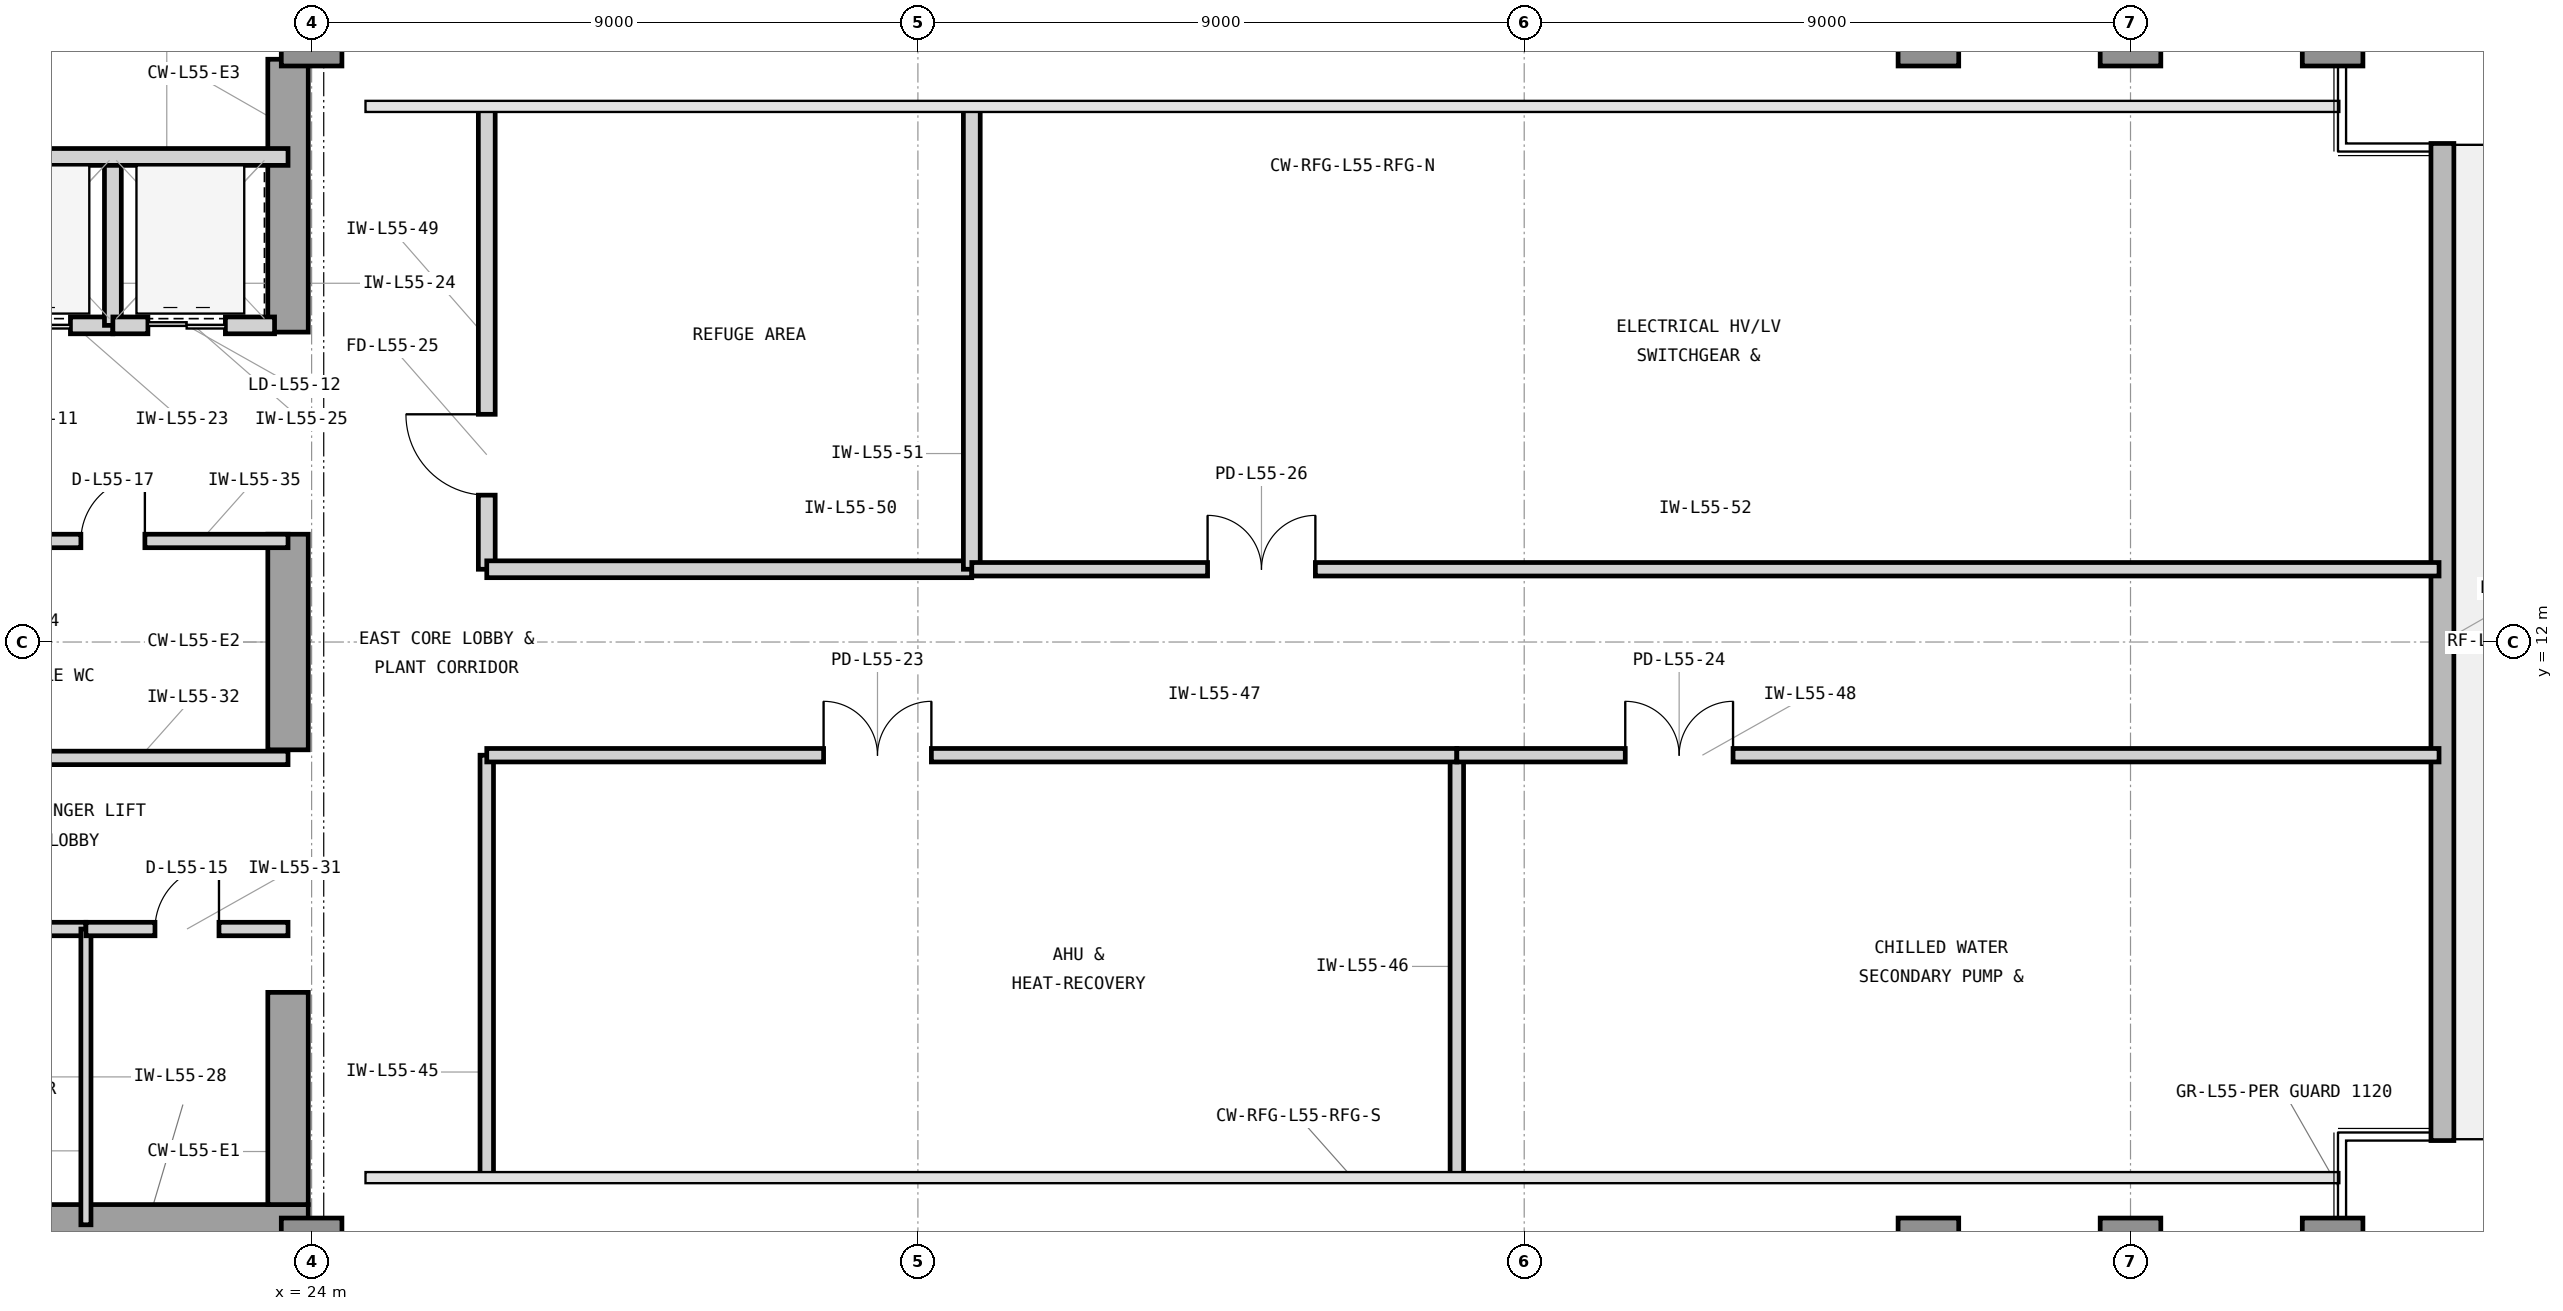
"""IFC4 building model, lengths in metres.
Left out: names, types, materials, properties, quantities, classifications, styles, units other than length and angle.
Written with IfcOpenShell. Run it as: python <this file> out.ifc"""

import sys

from ifc_helpers import new_model, si_unit, direction, frame, frame_2d, origin, origin_2d, place, context, subcontext, project, spatial, rectangle, extrude, element, fill, save


model = new_model("IFC4")
c1 = context("Model", 3, precision=1e-05, world=origin(), true_north=direction((0.0, 1.0)))
c2 = subcontext(c1, "Body", "Model", "MODEL_VIEW")
j1 = project(units=[si_unit("LENGTHUNIT", "METRE"), si_unit("PLANEANGLEUNIT", "RADIAN")], contexts=[c1])
p1 = place(None, origin())
s1 = spatial("IfcSite", under=j1, at=p1, CompositionType="ELEMENT")
p2 = place(p1, origin())
s2 = spatial("IfcBuilding", under=s1, at=p2, CompositionType="ELEMENT")
p3 = place(p2, frame((0.0, 0.0, 226.8)))
s3 = spatial("IfcBuildingStorey", under=s2, at=p3, CompositionType="ELEMENT", Elevation=226.8)
p4 = place(p3, frame((7.475, 3.35, 0.0), z_axis=(0.0, 0.0, 1.0), x_axis=(1.0, 0.0, 0.0)))
e1 = element("IfcWall", 1, at=p4, inside=s3, PredefinedType="SHEAR", context=c2, shape_type="SweptSolid", body=[
    extrude(rectangle(XDim=16.475, YDim=0.6, at=frame_2d((8.237, 0.0))), origin(), (0.0, 0.0, 1.0), 4.5),
])
p5 = place(p3, frame((23.65, 3.65, 0.0), z_axis=(0.0, 0.0, 1.0), x_axis=(0.0, 1.0, 0.0)))
e2 = element("IfcWall", 2, at=p5, inside=s3, PredefinedType="SHEAR", context=c2, shape_type="SweptSolid", body=[
    extrude(rectangle(XDim=3.15, YDim=0.6, at=frame_2d((1.575, 0.0))), origin(), (0.0, 0.0, 1.0), 4.5),
])
p6 = place(p3, frame((23.65, 10.4, 0.0), z_axis=(0.0, 0.0, 1.0), x_axis=(0.0, 1.0, 0.0)))
e3 = element("IfcWall", 3, at=p6, inside=s3, PredefinedType="SHEAR", context=c2, shape_type="SweptSolid", body=[
    extrude(rectangle(XDim=3.2, YDim=0.6, at=frame_2d((1.6, 0.0))), origin(), (0.0, 0.0, 1.0), 4.5),
])
p7 = place(p3, frame((23.65, 16.6, 0.0), z_axis=(0.0, 0.0, 1.0), x_axis=(0.0, 1.0, 0.0)))
e4 = element("IfcWall", 4, at=p7, inside=s3, PredefinedType="SHEAR", context=c2, shape_type="SweptSolid", body=[
    extrude(rectangle(XDim=4.05, YDim=0.6, at=frame_2d((2.025, 0.0))), origin(), (0.0, 0.0, 1.0), 4.5),
])
for number, where, z_axis, x_axis in (
    (5, (24.0, 3.0, 0.0), (0.0, 0.0, 1.0), (1.0, 0.0, 0.0)),
    (6, (24.0, 21.0, 0.0), (0.0, 0.0, 1.0), (1.0, 0.0, 0.0)),
    (7, (48.0, 3.0, 0.0), (0.0, 0.0, 1.0), (1.0, 0.0, 0.0)),
    (8, (48.0, 21.0, 0.0), (0.0, 0.0, 1.0), (1.0, 0.0, 0.0)),
    (9, (51.0, 3.0, 0.0), (0.0, 0.0, 1.0), (1.0, 0.0, 0.0)),
    (10, (51.0, 21.0, 0.0), (0.0, 0.0, 1.0), (1.0, 0.0, 0.0)),
    (11, (54.0, 3.0, 0.0), (0.0, 0.0, 1.0), (1.0, 0.0, 0.0)),
    (12, (54.0, 21.0, 0.0), (0.0, 0.0, 1.0), (1.0, 0.0, 0.0)),
):
    element("IfcColumn", number, at=place(p3, frame(where, z_axis=z_axis, x_axis=x_axis)), inside=s3, PredefinedType="COLUMN", context=c2, shape_type="SweptSolid", body=[
        extrude(rectangle(XDim=0.9, YDim=0.9, at=origin_2d()), origin(), (0.0, 0.0, 1.0), 4.5),
    ])
p8 = place(p3, frame((55.63, 4.6, 0.0), z_axis=(0.0, 0.0, 1.0), x_axis=(0.0, 1.0, 0.0)))
e13 = element("IfcWall", 13, at=p8, inside=s3, PredefinedType="STANDARD", context=c2, shape_type="SweptSolid", body=[
    extrude(rectangle(XDim=14.8, YDim=0.34, at=frame_2d((7.4, 0.0))), origin(), (0.0, 0.0, 1.0), 4.3),
])
p9 = place(p3, frame((18.75, 16.7, 0.0), z_axis=(0.0, 0.0, 1.0), x_axis=(1.0, 0.0, 0.0)))
e14 = element("IfcWall", 14, at=p9, inside=s3, PredefinedType="PARTITIONING", context=c2, shape_type="SweptSolid", body=[
    extrude(rectangle(XDim=2.3, YDim=0.25, at=frame_2d((1.15, 0.0))), origin(), (0.0, 0.0, 1.0), 3.673),
])
p10 = place(p9, frame((0.52, 0.0, 0.0)))
e15 = element("IfcOpeningElement", 15, at=p10, cuts=e14, PredefinedType="OPENING", context=c2, shape_type="SweptSolid", body=[
    extrude(rectangle(XDim=1.15, YDim=2.25, at=frame_2d((0.575, 1.125))), frame((0.0, 0.135, 0.0), z_axis=(0.0, -1.0, 0.0), x_axis=(1.0, 0.0, 0.0)), (0.0, 0.0, 1.0), 0.27),
])
p11 = place(p3, frame((21.05, 16.7, 0.0), z_axis=(0.0, 0.0, 1.0), x_axis=(0.0, 1.0, 0.0)))
e16 = element("IfcWall", 16, at=p11, inside=s3, PredefinedType="PARTITIONING", context=c2, shape_type="SweptSolid", body=[
    extrude(rectangle(XDim=2.5, YDim=0.25, at=frame_2d((1.25, 0.0))), origin(), (0.0, 0.0, 1.0), 4.29),
])
p12 = place(p3, frame((21.05, 16.7, 0.0), z_axis=(0.0, 0.0, 1.0), x_axis=(1.0, 0.0, 0.0)))
e17 = element("IfcWall", 17, at=p12, inside=s3, PredefinedType="PARTITIONING", context=c2, shape_type="SweptSolid", body=[
    extrude(rectangle(XDim=2.4, YDim=0.25, at=frame_2d((1.2, 0.0))), origin(), (0.0, 0.0, 1.0), 3.673),
])
p13 = place(p12, frame((0.52, 0.0, 0.0)))
e18 = element("IfcOpeningElement", 18, at=p13, cuts=e17, PredefinedType="OPENING", context=c2, shape_type="SweptSolid", body=[
    extrude(rectangle(XDim=1.15, YDim=2.25, at=frame_2d((0.575, 1.125))), frame((0.0, 0.135, 0.0), z_axis=(0.0, -1.0, 0.0), x_axis=(1.0, 0.0, 0.0)), (0.0, 0.0, 1.0), 0.27),
])
p14 = place(p3, frame((16.45, 19.2, 0.0), z_axis=(0.0, 0.0, 1.0), x_axis=(1.0, 0.0, 0.0)))
e19 = element("IfcWall", 19, at=p14, inside=s3, PredefinedType="PARTITIONING", context=c2, shape_type="SweptSolid", body=[
    extrude(rectangle(XDim=7.2, YDim=0.25, at=frame_2d((3.6, 0.0))), origin(), (0.0, 0.0, 1.0), 4.29),
])
p15 = place(p3, frame((17.65, 7.74, 0.0), z_axis=(0.0, 0.0, 1.0), x_axis=(1.0, 0.0, 0.0)))
e20 = element("IfcWall", 20, at=p15, inside=s3, PredefinedType="PARTITIONING", context=c2, shape_type="SweptSolid", body=[
    extrude(rectangle(XDim=3.0, YDim=0.2, at=frame_2d((1.5, 0.0))), origin(), (0.0, 0.0, 1.0), 4.29),
])
p16 = place(p15, frame((1.0, 0.0, 0.0)))
e21 = element("IfcOpeningElement", 21, at=p16, cuts=e20, PredefinedType="OPENING", context=c2, shape_type="SweptSolid", body=[
    extrude(rectangle(XDim=1.0, YDim=2.15, at=frame_2d((0.5, 1.075))), frame((0.0, 0.11, 0.0), z_axis=(0.0, -1.0, 0.0), x_axis=(1.0, 0.0, 0.0)), (0.0, 0.0, 1.0), 0.22),
])
p17 = place(p3, frame((20.65, 3.35, 0.0), z_axis=(0.0, 0.0, 1.0), x_axis=(0.0, 1.0, 0.0)))
e22 = element("IfcWall", 22, at=p17, inside=s3, PredefinedType="PARTITIONING", context=c2, shape_type="SweptSolid", body=[
    extrude(rectangle(XDim=4.39, YDim=0.15, at=frame_2d((2.195, 0.0))), origin(), (0.0, 0.0, 1.0), 4.29),
])
p18 = place(p3, frame((20.65, 7.74, 0.0), z_axis=(0.0, 0.0, 1.0), x_axis=(1.0, 0.0, 0.0)))
e23 = element("IfcWall", 23, at=p18, inside=s3, PredefinedType="PARTITIONING", context=c2, shape_type="SweptSolid", body=[
    extrude(rectangle(XDim=3.0, YDim=0.2, at=frame_2d((1.5, 0.0))), origin(), (0.0, 0.0, 1.0), 4.29),
])
p19 = place(p18, frame((1.025, 0.0, 0.0)))
e24 = element("IfcOpeningElement", 24, at=p19, cuts=e23, PredefinedType="OPENING", context=c2, shape_type="SweptSolid", body=[
    extrude(rectangle(XDim=0.95, YDim=2.1, at=frame_2d((0.475, 1.05))), frame((0.0, 0.11, 0.0), z_axis=(0.0, -1.0, 0.0), x_axis=(1.0, 0.0, 0.0)), (0.0, 0.0, 1.0), 0.22),
])
p20 = place(p3, frame((14.825, 10.28, 0.0), z_axis=(0.0, 0.0, 1.0), x_axis=(1.0, 0.0, 0.0)))
e25 = element("IfcWall", 25, at=p20, inside=s3, PredefinedType="PARTITIONING", context=c2, shape_type="SweptSolid", body=[
    extrude(rectangle(XDim=8.825, YDim=0.2, at=frame_2d((4.413, 0.0))), origin(), (0.0, 0.0, 1.0), 4.29),
])
p21 = place(p3, frame((18.45, 13.5, 0.0), z_axis=(0.0, 0.0, 1.0), x_axis=(1.0, 0.0, 0.0)))
e26 = element("IfcWall", 26, at=p21, inside=s3, PredefinedType="PARTITIONING", context=c2, shape_type="SweptSolid", body=[
    extrude(rectangle(XDim=5.2, YDim=0.2, at=frame_2d((2.6, 0.0))), origin(), (0.0, 0.0, 1.0), 3.673),
])
p22 = place(p21, frame((2.125, 0.0, 0.0)))
e27 = element("IfcOpeningElement", 27, at=p22, cuts=e26, PredefinedType="OPENING", context=c2, shape_type="SweptSolid", body=[
    extrude(rectangle(XDim=0.95, YDim=2.1, at=frame_2d((0.475, 1.05))), frame((0.0, 0.11, 0.0), z_axis=(0.0, -1.0, 0.0), x_axis=(1.0, 0.0, 0.0)), (0.0, 0.0, 1.0), 0.22),
])
for number, where, z_axis, x_axis in (
    (28, (26.6, 4.05, 0.0), (0.0, 0.0, 1.0), (0.0, 1.0, 0.0)),
    (29, (41.0, 4.05, 0.0), (0.0, 0.0, 1.0), (0.0, 1.0, 0.0)),
):
    element("IfcWall", number, at=place(p3, frame(where, z_axis=z_axis, x_axis=x_axis)), inside=s3, PredefinedType="PARTITIONING", context=c2, shape_type="SweptSolid", body=[
        extrude(rectangle(XDim=6.27, YDim=0.2, at=frame_2d((3.135, 0.0))), origin(), (0.0, 0.0, 1.0), 4.29),
    ])
p23 = place(p3, frame((26.6, 10.32, 0.0), z_axis=(0.0, 0.0, 1.0), x_axis=(1.0, 0.0, 0.0)))
e30 = element("IfcWall", 30, at=p23, inside=s3, PredefinedType="PARTITIONING", context=c2, shape_type="SweptSolid", body=[
    extrude(rectangle(XDim=14.4, YDim=0.2, at=frame_2d((7.2, 0.0))), origin(), (0.0, 0.0, 1.0), 4.29),
])
p24 = place(p23, frame((5.0, 0.0, 0.0)))
e31 = element("IfcOpeningElement", 31, at=p24, cuts=e30, PredefinedType="OPENING", context=c2, shape_type="SweptSolid", body=[
    extrude(rectangle(XDim=1.6, YDim=2.3, at=frame_2d((0.8, 1.15))), frame((0.0, 0.11, 0.0), z_axis=(0.0, -1.0, 0.0), x_axis=(1.0, 0.0, 0.0)), (0.0, 0.0, 1.0), 0.22),
])
p25 = place(p3, frame((41.0, 10.32, 0.0), z_axis=(0.0, 0.0, 1.0), x_axis=(1.0, 0.0, 0.0)))
e32 = element("IfcWall", 32, at=p25, inside=s3, PredefinedType="PARTITIONING", context=c2, shape_type="SweptSolid", body=[
    extrude(rectangle(XDim=14.58, YDim=0.2, at=frame_2d((7.29, 0.0))), origin(), (0.0, 0.0, 1.0), 4.29),
])
p26 = place(p25, frame((2.5, 0.0, 0.0)))
e33 = element("IfcOpeningElement", 33, at=p26, cuts=e32, PredefinedType="OPENING", context=c2, shape_type="SweptSolid", body=[
    extrude(rectangle(XDim=1.6, YDim=2.3, at=frame_2d((0.8, 1.15))), frame((0.0, 0.11, 0.0), z_axis=(0.0, -1.0, 0.0), x_axis=(1.0, 0.0, 0.0)), (0.0, 0.0, 1.0), 0.22),
])
p27 = place(p3, frame((26.6, 13.08, 0.0), z_axis=(0.0, 0.0, 1.0), x_axis=(0.0, 1.0, 0.0)))
e34 = element("IfcWall", 34, at=p27, inside=s3, PredefinedType="PARTITIONING", context=c2, shape_type="SweptSolid", body=[
    extrude(rectangle(XDim=6.87, YDim=0.25, at=frame_2d((3.435, 0.0))), origin(), (0.0, 0.0, 1.0), 4.29),
])
p28 = place(p27, frame((1.1, 0.0, 0.0)))
e35 = element("IfcOpeningElement", 35, at=p28, cuts=e34, PredefinedType="OPENING", context=c2, shape_type="SweptSolid", body=[
    extrude(rectangle(XDim=1.2, YDim=2.2, at=frame_2d((0.6, 1.1))), frame((0.0, 0.135, 0.0), z_axis=(0.0, -1.0, 0.0), x_axis=(1.0, 0.0, 0.0)), (0.0, 0.0, 1.0), 0.27),
])
p29 = place(p3, frame((26.6, 13.08, 0.0), z_axis=(0.0, 0.0, 1.0), x_axis=(1.0, 0.0, 0.0)))
e36 = element("IfcWall", 36, at=p29, inside=s3, PredefinedType="PARTITIONING", context=c2, shape_type="SweptSolid", body=[
    extrude(rectangle(XDim=7.2, YDim=0.25, at=frame_2d((3.6, 0.0))), origin(), (0.0, 0.0, 1.0), 4.29),
])
p30 = place(p3, frame((33.8, 13.08, 0.0), z_axis=(0.0, 0.0, 1.0), x_axis=(0.0, 1.0, 0.0)))
e37 = element("IfcWall", 37, at=p30, inside=s3, PredefinedType="PARTITIONING", context=c2, shape_type="SweptSolid", body=[
    extrude(rectangle(XDim=6.87, YDim=0.25, at=frame_2d((3.435, 0.0))), origin(), (0.0, 0.0, 1.0), 4.29),
])
p31 = place(p3, frame((33.8, 13.08, 0.0), z_axis=(0.0, 0.0, 1.0), x_axis=(1.0, 0.0, 0.0)))
e38 = element("IfcWall", 38, at=p31, inside=s3, PredefinedType="PARTITIONING", context=c2, shape_type="SweptSolid", body=[
    extrude(rectangle(XDim=21.78, YDim=0.2, at=frame_2d((10.89, 0.0))), origin(), (0.0, 0.0, 1.0), 4.29),
])
p32 = place(p31, frame((3.5, 0.0, 0.0)))
e39 = element("IfcOpeningElement", 39, at=p32, cuts=e38, PredefinedType="OPENING", context=c2, shape_type="SweptSolid", body=[
    extrude(rectangle(XDim=1.6, YDim=2.3, at=frame_2d((0.8, 1.15))), frame((0.0, 0.11, 0.0), z_axis=(0.0, -1.0, 0.0), x_axis=(1.0, 0.0, 0.0)), (0.0, 0.0, 1.0), 0.22),
])
p33 = place(p10, origin())
e40 = element("IfcDoor", 40, at=p33, inside=s3, OperationType="DOUBLE_DOOR_SLIDING", PredefinedType="DOOR", context=c2, shape_type="SweptSolid", body=[
    extrude(rectangle(XDim=1.15, YDim=2.25, at=frame_2d((0.575, 1.125))), frame((0.0, 0.025, 0.0), z_axis=(0.0, -1.0, 0.0), x_axis=(1.0, 0.0, 0.0)), (0.0, 0.0, 1.0), 0.05),
])
fill(e15, e40)
p34 = place(p13, origin())
e41 = element("IfcDoor", 41, at=p34, inside=s3, OperationType="DOUBLE_DOOR_SLIDING", PredefinedType="DOOR", context=c2, shape_type="SweptSolid", body=[
    extrude(rectangle(XDim=1.15, YDim=2.25, at=frame_2d((0.575, 1.125))), frame((0.0, 0.025, 0.0), z_axis=(0.0, -1.0, 0.0), x_axis=(1.0, 0.0, 0.0)), (0.0, 0.0, 1.0), 0.05),
])
fill(e18, e41)
p35 = place(p19, origin())
e42 = element("IfcDoor", 42, at=p35, inside=s3, OperationType="SINGLE_SWING_RIGHT", PredefinedType="DOOR", context=c2, shape_type="SweptSolid", body=[
    extrude(rectangle(XDim=0.95, YDim=2.1, at=frame_2d((0.475, 1.05))), frame((0.0, 0.025, 0.0), z_axis=(0.0, -1.0, 0.0), x_axis=(1.0, 0.0, 0.0)), (0.0, 0.0, 1.0), 0.05),
])
fill(e24, e42)
p36 = place(p22, origin())
e43 = element("IfcDoor", 43, at=p36, inside=s3, OperationType="SINGLE_SWING_RIGHT", PredefinedType="DOOR", context=c2, shape_type="SweptSolid", body=[
    extrude(rectangle(XDim=0.95, YDim=2.1, at=frame_2d((0.475, 1.05))), frame((0.0, 0.025, 0.0), z_axis=(0.0, -1.0, 0.0), x_axis=(1.0, 0.0, 0.0)), (0.0, 0.0, 1.0), 0.05),
])
fill(e27, e43)
p37 = place(p24, origin())
e44 = element("IfcDoor", 44, at=p37, inside=s3, OperationType="DOUBLE_DOOR_SINGLE_SWING", PredefinedType="DOOR", context=c2, shape_type="SweptSolid", body=[
    extrude(rectangle(XDim=1.6, YDim=2.3, at=frame_2d((0.8, 1.15))), frame((0.0, 0.025, 0.0), z_axis=(0.0, -1.0, 0.0), x_axis=(1.0, 0.0, 0.0)), (0.0, 0.0, 1.0), 0.05),
])
fill(e31, e44)
p38 = place(p26, origin())
e45 = element("IfcDoor", 45, at=p38, inside=s3, OperationType="DOUBLE_DOOR_SINGLE_SWING", PredefinedType="DOOR", context=c2, shape_type="SweptSolid", body=[
    extrude(rectangle(XDim=1.6, YDim=2.3, at=frame_2d((0.8, 1.15))), frame((0.0, 0.025, 0.0), z_axis=(0.0, -1.0, 0.0), x_axis=(1.0, 0.0, 0.0)), (0.0, 0.0, 1.0), 0.05),
])
fill(e33, e45)
p39 = place(p28, origin())
e46 = element("IfcDoor", 46, at=p39, inside=s3, OperationType="SINGLE_SWING_RIGHT", PredefinedType="DOOR", context=c2, shape_type="SweptSolid", body=[
    extrude(rectangle(XDim=1.2, YDim=2.2, at=frame_2d((0.6, 1.1))), frame((0.0, 0.025, 0.0), z_axis=(0.0, -1.0, 0.0), x_axis=(1.0, 0.0, 0.0)), (0.0, 0.0, 1.0), 0.05),
])
fill(e35, e46)
p40 = place(p32, origin())
e47 = element("IfcDoor", 47, at=p40, inside=s3, OperationType="DOUBLE_DOOR_SINGLE_SWING", PredefinedType="DOOR", context=c2, shape_type="SweptSolid", body=[
    extrude(rectangle(XDim=1.6, YDim=2.3, at=frame_2d((0.8, 1.15))), frame((0.0, 0.025, 0.0), z_axis=(0.0, -1.0, 0.0), x_axis=(1.0, 0.0, 0.0)), (0.0, 0.0, 1.0), 0.05),
])
fill(e39, e47)
save(model, sys.argv[1])
